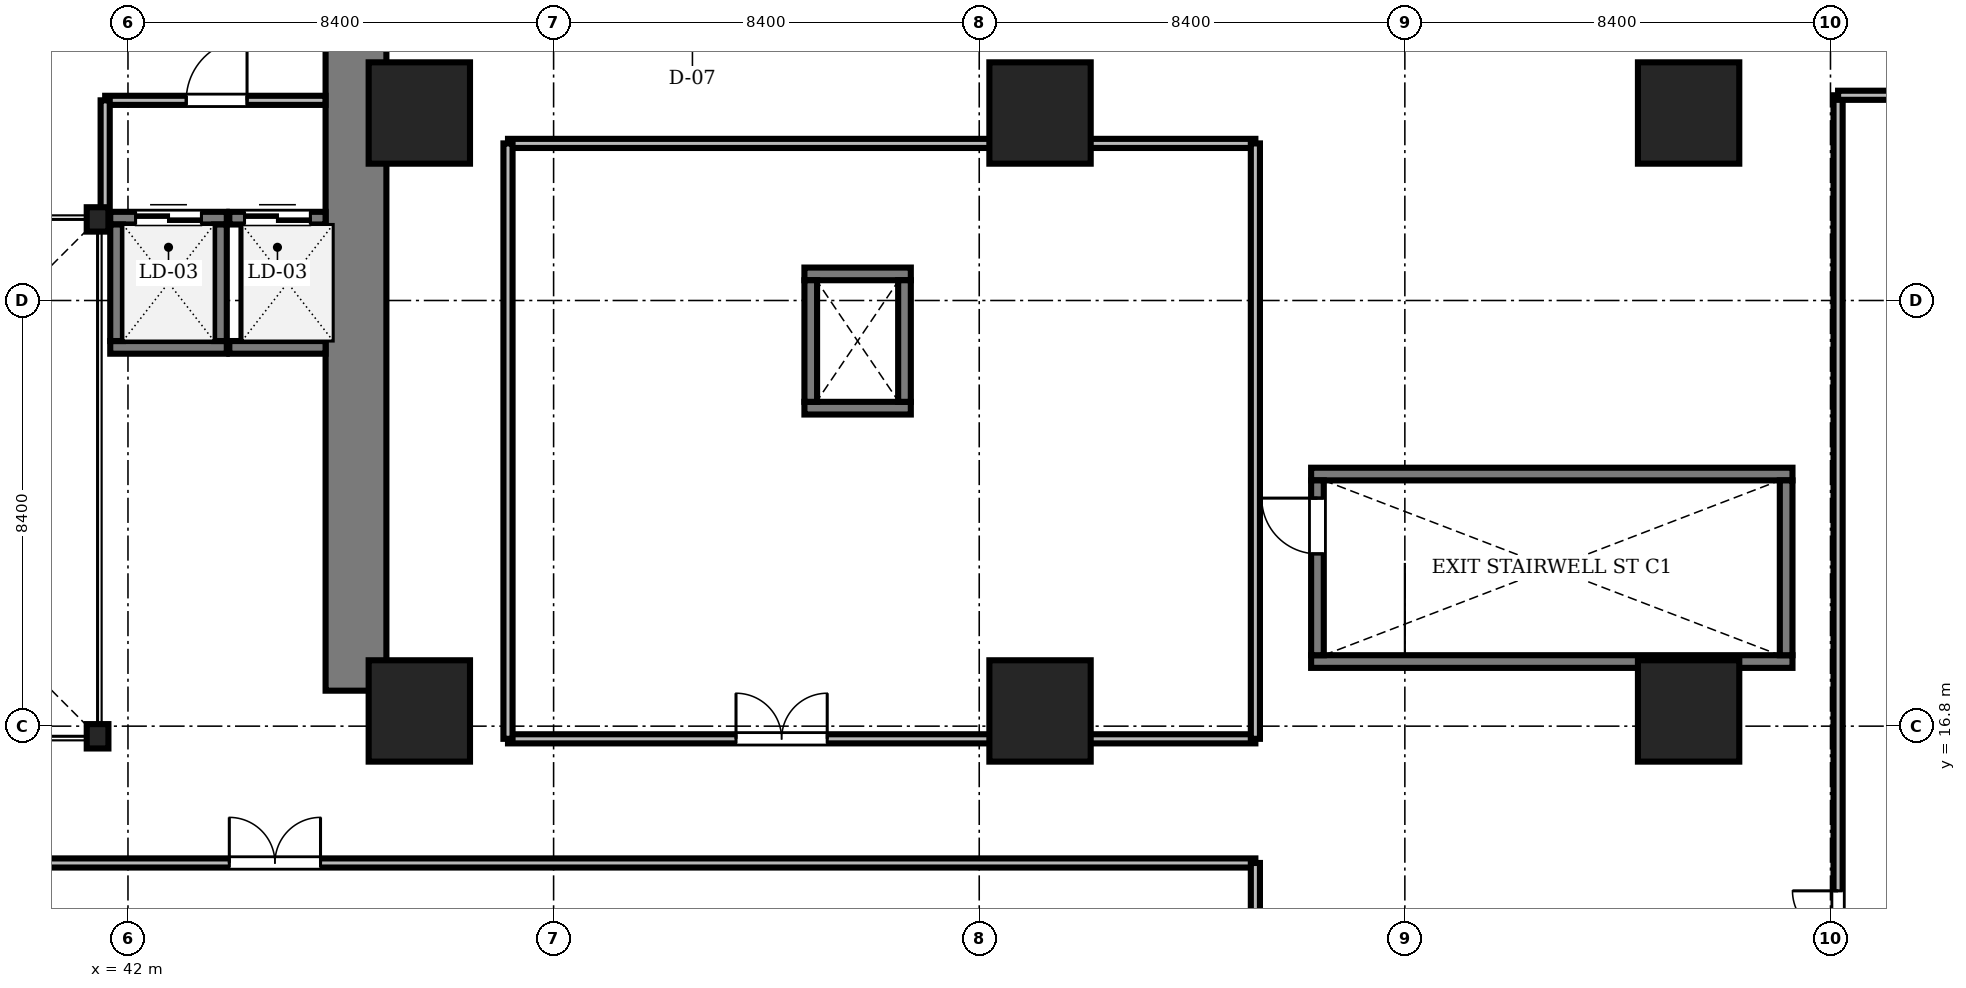
"""IFC4 building model, lengths in metres.
Left out: names, types, materials, properties, quantities, classifications, styles, units other than length and angle.
Written with IfcOpenShell. Run it as: python <this file> out.ifc"""

import sys

from ifc_helpers import new_model, si_unit, direction, frame, frame_2d, origin, origin_2d, place, context, subcontext, project, spatial, rectangle, i_section, extrude, source, transform, mapped, element, fill, save


model = new_model("IFC4")
c1 = context("Model", 3, precision=1e-05, world=origin(), true_north=direction((0.0, 1.0)))
c2 = subcontext(c1, "Body", "Model", "MODEL_VIEW")
j1 = project(units=[si_unit("LENGTHUNIT", "METRE"), si_unit("PLANEANGLEUNIT", "RADIAN")], contexts=[c1])
p1 = place(None, origin())
s1 = spatial("IfcSite", under=j1, at=p1, CompositionType="ELEMENT")
p2 = place(p1, origin())
s2 = spatial("IfcBuilding", under=s1, at=p2, CompositionType="ELEMENT")
p3 = place(p2, frame((0.0, 0.0, 11.4)))
s3 = spatial("IfcBuildingStorey", under=s2, at=p3, CompositionType="ELEMENT", Elevation=11.4)
m1 = source(origin(), c2, "Body", "SweptSolid", [
    extrude(rectangle(XDim=13.15, YDim=1.2, at=frame_2d((6.575, 0.0))), origin(), (0.0, 0.0, 1.0), 5.2),
])
p4 = place(p3, frame((46.5, 17.5, 0.0), z_axis=(0.0, 0.0, 1.0), x_axis=(0.0, 1.0, 0.0)))
e1 = element("IfcWall", 1, at=p4, inside=s3, PredefinedType="SHEAR", context=c2, shape_type="MappedRepresentation", body=[
    mapped(m1, transform((0.0, 0.0, 0.0), scale=1.0)),
])
m2 = source(origin(), c2, "Body", "SweptSolid", [
    extrude(i_section(OverallWidth=0.428, OverallDepth=0.481, WebThickness=0.04, FlangeThickness=0.063, FilletRadius=0.015, at=origin_2d()), origin(), (0.0, 0.0, 1.0), 5.2),
])
for number, where, z_axis, x_axis in (
    (2, (41.4, 16.6, 0.0), (0.0, 0.0, 1.0), (1.0, 0.0, 0.0)),
    (3, (41.4, 26.8, 0.0), (0.0, 0.0, 1.0), (1.0, 0.0, 0.0)),
):
    element("IfcColumn", number, at=place(p3, frame(where, z_axis=z_axis, x_axis=x_axis)), inside=s3, PredefinedType="COLUMN", context=c2, shape_type="MappedRepresentation", body=[
        mapped(m2, transform((0.0, 0.0, 0.0), scale=1.0)),
    ])
m3 = source(origin(), c2, "Body", "SweptSolid", [
    extrude(rectangle(XDim=2.0, YDim=2.0, at=origin_2d()), origin(), (0.0, 0.0, 1.0), 5.2),
])
for number, where, z_axis, x_axis in (
    (4, (47.75, 17.1, 0.0), (0.0, 0.0, 1.0), (1.0, 0.0, 0.0)),
    (5, (60.0, 17.1, 0.0), (0.0, 0.0, 1.0), (1.0, 0.0, 0.0)),
    (6, (72.8, 17.1, 0.0), (0.0, 0.0, 1.0), (1.0, 0.0, 0.0)),
    (7, (47.75, 28.9, 0.0), (0.0, 0.0, 1.0), (1.0, 0.0, 0.0)),
    (8, (60.0, 28.9, 0.0), (0.0, 0.0, 1.0), (1.0, 0.0, 0.0)),
    (9, (72.8, 28.9, 0.0), (0.0, 0.0, 1.0), (1.0, 0.0, 0.0)),
):
    element("IfcColumn", number, at=place(p3, frame(where, z_axis=z_axis, x_axis=x_axis)), inside=s3, PredefinedType="COLUMN", context=c2, shape_type="MappedRepresentation", body=[
        mapped(m3, transform((0.0, 0.0, 0.0), scale=1.0)),
    ])
m4 = source(origin(), c2, "Body", "SweptSolid", [
    extrude(rectangle(XDim=9.5, YDim=0.25, at=frame_2d((4.75, 0.0))), origin(), (0.0, 0.0, 1.0), 5.2),
])
for number, where, z_axis, x_axis in (
    (10, (65.35, 18.075, 0.0), (0.0, 0.0, 1.0), (1.0, 0.0, 0.0)),
    (11, (65.35, 21.775, 0.0), (0.0, 0.0, 1.0), (1.0, 0.0, 0.0)),
):
    element("IfcWall", number, at=place(p3, frame(where, z_axis=z_axis, x_axis=x_axis)), inside=s3, PredefinedType="SOLIDWALL", context=c2, shape_type="MappedRepresentation", body=[
        mapped(m4, transform((0.0, 0.0, 0.0), scale=1.0)),
    ])
m5 = source(origin(), c2, "Body", "SweptSolid", [
    extrude(rectangle(XDim=3.45, YDim=0.25, at=frame_2d((1.725, 0.0))), origin(), (0.0, 0.0, 1.0), 5.2),
])
p5 = place(p3, frame((74.725, 18.2, 0.0), z_axis=(0.0, 0.0, 1.0), x_axis=(0.0, 1.0, 0.0)))
e12 = element("IfcWall", 12, at=p5, inside=s3, PredefinedType="SOLIDWALL", context=c2, shape_type="MappedRepresentation", body=[
    mapped(m5, transform((0.0, 0.0, 0.0), scale=1.0)),
])
p6 = place(p3, frame((65.475, 18.2, 0.0), z_axis=(0.0, 0.0, 1.0), x_axis=(0.0, 1.0, 0.0)))
e13 = element("IfcWall", 13, at=p6, inside=s3, PredefinedType="SOLIDWALL", context=c2, shape_type="MappedRepresentation", body=[
    mapped(m5, transform((0.0, 0.0, 0.0), scale=1.0)),
])
m6 = source(origin(), c2, "Body", "SweptSolid", [
    extrude(rectangle(XDim=1.1, YDim=2.2, at=frame_2d((0.55, 1.1))), frame((0.0, 0.135, 0.0), z_axis=(0.0, -1.0, 0.0), x_axis=(1.0, 0.0, 0.0)), (0.0, 0.0, 1.0), 0.27),
])
p7 = place(p6, frame((2.0, 0.0, 0.0)))
e14 = element("IfcOpeningElement", 14, at=p7, cuts=e13, PredefinedType="OPENING", context=c2, shape_type="MappedRepresentation", body=[
    mapped(m6, transform((0.0, 0.0, 0.0), scale=1.0)),
])
m7 = source(origin(), c2, "Body", "SweptSolid", [
    extrude(rectangle(XDim=2.1, YDim=0.25, at=frame_2d((1.05, 0.0))), origin(), (0.0, 0.0, 1.0), 5.2),
])
for number, where, z_axis, x_axis in (
    (15, (55.35, 23.075, 0.0), (0.0, 0.0, 1.0), (1.0, 0.0, 0.0)),
    (16, (55.35, 25.725, 0.0), (0.0, 0.0, 1.0), (1.0, 0.0, 0.0)),
):
    element("IfcWall", number, at=place(p3, frame(where, z_axis=z_axis, x_axis=x_axis)), inside=s3, PredefinedType="SOLIDWALL", context=c2, shape_type="MappedRepresentation", body=[
        mapped(m7, transform((0.0, 0.0, 0.0), scale=1.0)),
    ])
m8 = source(origin(), c2, "Body", "SweptSolid", [
    extrude(rectangle(XDim=2.4, YDim=0.25, at=frame_2d((1.2, 0.0))), origin(), (0.0, 0.0, 1.0), 5.2),
])
for number, where, z_axis, x_axis in (
    (17, (55.475, 23.2, 0.0), (0.0, 0.0, 1.0), (0.0, 1.0, 0.0)),
    (18, (57.325, 23.2, 0.0), (0.0, 0.0, 1.0), (0.0, 1.0, 0.0)),
):
    element("IfcWall", number, at=place(p3, frame(where, z_axis=z_axis, x_axis=x_axis)), inside=s3, PredefinedType="SOLIDWALL", context=c2, shape_type="MappedRepresentation", body=[
        mapped(m8, transform((0.0, 0.0, 0.0), scale=1.0)),
    ])
m9 = source(origin(), c2, "Body", "SweptSolid", [
    extrude(rectangle(XDim=2.3, YDim=0.25, at=frame_2d((1.15, 0.0))), origin(), (0.0, 0.0, 1.0), 5.2),
])
p8 = place(p3, frame((41.65, 24.275, 0.0), z_axis=(0.0, 0.0, 1.0), x_axis=(1.0, 0.0, 0.0)))
e19 = element("IfcWall", 19, at=p8, inside=s3, PredefinedType="SOLIDWALL", context=c2, shape_type="MappedRepresentation", body=[
    mapped(m9, transform((0.0, 0.0, 0.0), scale=1.0)),
])
p9 = place(p3, frame((41.65, 26.825, 0.0), z_axis=(0.0, 0.0, 1.0), x_axis=(1.0, 0.0, 0.0)))
e20 = element("IfcWall", 20, at=p9, inside=s3, PredefinedType="SOLIDWALL", context=c2, shape_type="MappedRepresentation", body=[
    mapped(m9, transform((0.0, 0.0, 0.0), scale=1.0)),
])
m10 = source(origin(), c2, "Body", "SweptSolid", [
    extrude(rectangle(XDim=1.3, YDim=2.3, at=frame_2d((0.65, 1.15))), frame((0.0, 0.135, 0.0), z_axis=(0.0, -1.0, 0.0), x_axis=(1.0, 0.0, 0.0)), (0.0, 0.0, 1.0), 0.27),
])
p10 = place(p9, frame((0.5, 0.0, 0.0)))
e21 = element("IfcOpeningElement", 21, at=p10, cuts=e20, PredefinedType="OPENING", context=c2, shape_type="MappedRepresentation", body=[
    mapped(m10, transform((0.0, 0.0, 0.0), scale=1.0)),
])
for number, where, z_axis, x_axis in (
    (22, (41.775, 24.4, 0.0), (0.0, 0.0, 1.0), (0.0, 1.0, 0.0)),
    (23, (43.825, 24.4, 0.0), (0.0, 0.0, 1.0), (0.0, 1.0, 0.0)),
):
    element("IfcWall", number, at=place(p3, frame(where, z_axis=z_axis, x_axis=x_axis)), inside=s3, PredefinedType="SOLIDWALL", context=c2, shape_type="MappedRepresentation", body=[
        mapped(m9, transform((0.0, 0.0, 0.0), scale=1.0)),
    ])
m11 = source(origin(), c2, "Body", "SweptSolid", [
    extrude(rectangle(XDim=1.9, YDim=0.25, at=frame_2d((0.95, 0.0))), origin(), (0.0, 0.0, 1.0), 5.2),
])
p11 = place(p3, frame((44.0, 24.275, 0.0), z_axis=(0.0, 0.0, 1.0), x_axis=(1.0, 0.0, 0.0)))
e24 = element("IfcWall", 24, at=p11, inside=s3, PredefinedType="SOLIDWALL", context=c2, shape_type="MappedRepresentation", body=[
    mapped(m11, transform((0.0, 0.0, 0.0), scale=1.0)),
])
p12 = place(p3, frame((44.0, 26.825, 0.0), z_axis=(0.0, 0.0, 1.0), x_axis=(1.0, 0.0, 0.0)))
e25 = element("IfcWall", 25, at=p12, inside=s3, PredefinedType="SOLIDWALL", context=c2, shape_type="MappedRepresentation", body=[
    mapped(m11, transform((0.0, 0.0, 0.0), scale=1.0)),
])
p13 = place(p12, frame((0.3, 0.0, 0.0)))
e26 = element("IfcOpeningElement", 26, at=p13, cuts=e25, PredefinedType="OPENING", context=c2, shape_type="MappedRepresentation", body=[
    mapped(m10, transform((0.0, 0.0, 0.0), scale=1.0)),
])
m12 = source(origin(), c2, "Body", "SweptSolid", [
    extrude(rectangle(XDim=30.25, YDim=0.18, at=frame_2d((15.125, 0.0))), origin(), (0.0, 0.0, 1.0), 3.392),
])
p14 = place(p3, frame((34.0, 14.1, 0.0), z_axis=(0.0, 0.0, 1.0), x_axis=(1.0, 0.0, 0.0)))
e27 = element("IfcWall", 27, at=p14, inside=s3, PredefinedType="PARTITIONING", context=c2, shape_type="MappedRepresentation", body=[
    mapped(m12, transform((0.0, 0.0, 0.0), scale=1.0)),
])
m13 = source(origin(), c2, "Body", "SweptSolid", [
    extrude(rectangle(XDim=1.8, YDim=2.4, at=frame_2d((0.9, 1.2))), frame((0.0, 0.1, 0.0), z_axis=(0.0, -1.0, 0.0), x_axis=(1.0, 0.0, 0.0)), (0.0, 0.0, 1.0), 0.2),
])
p15 = place(p14, frame((10.0, 0.0, 0.0)))
e28 = element("IfcOpeningElement", 28, at=p15, cuts=e27, PredefinedType="OPENING", context=c2, shape_type="MappedRepresentation", body=[
    mapped(m13, transform((0.0, 0.0, 0.0), scale=1.0)),
])
m14 = source(origin(), c2, "Body", "SweptSolid", [
    extrude(rectangle(XDim=25.7, YDim=0.18, at=frame_2d((12.85, 0.0))), origin(), (0.0, 0.0, 1.0), 4.668),
])
p16 = place(p3, frame((75.75, 3.55, 0.0), z_axis=(0.0, 0.0, 1.0), x_axis=(0.0, 1.0, 0.0)))
e29 = element("IfcWall", 29, at=p16, inside=s3, PredefinedType="PARTITIONING", context=c2, shape_type="MappedRepresentation", body=[
    mapped(m14, transform((0.0, 0.0, 0.0), scale=1.0)),
])
p17 = place(p16, frame((8.2, 0.0, 0.0)))
e30 = element("IfcOpeningElement", 30, at=p17, cuts=e29, PredefinedType="OPENING", context=c2, shape_type="MappedRepresentation", body=[
    mapped(m13, transform((0.0, 0.0, 0.0), scale=1.0)),
])
m15 = source(origin(), c2, "Body", "SweptSolid", [
    extrude(rectangle(XDim=14.75, YDim=0.18, at=frame_2d((7.375, 0.0))), origin(), (0.0, 0.0, 1.0), 4.592),
])
p18 = place(p3, frame((49.5, 16.55, 0.0), z_axis=(0.0, 0.0, 1.0), x_axis=(1.0, 0.0, 0.0)))
e31 = element("IfcWall", 31, at=p18, inside=s3, PredefinedType="PARTITIONING", context=c2, shape_type="MappedRepresentation", body=[
    mapped(m15, transform((0.0, 0.0, 0.0), scale=1.0)),
])
p19 = place(p18, frame((4.5, 0.0, 0.0)))
e32 = element("IfcOpeningElement", 32, at=p19, cuts=e31, PredefinedType="OPENING", context=c2, shape_type="MappedRepresentation", body=[
    mapped(m13, transform((0.0, 0.0, 0.0), scale=1.0)),
])
m16 = source(origin(), c2, "Body", "SweptSolid", [
    extrude(rectangle(XDim=4.348, YDim=0.18, at=frame_2d((2.174, 0.0))), origin(), (0.0, 0.0, 1.0), 5.2),
])
p20 = place(p3, frame((41.55, 29.15, 0.0), z_axis=(0.0, 0.0, 1.0), x_axis=(1.0, 0.0, 0.0)))
e33 = element("IfcWall", 33, at=p20, inside=s3, PredefinedType="PARTITIONING", context=c2, shape_type="MappedRepresentation", body=[
    mapped(m16, transform((0.0, 0.0, 0.0), scale=1.0)),
])
m17 = source(origin(), c2, "Body", "SweptSolid", [
    extrude(rectangle(XDim=1.2, YDim=2.2, at=frame_2d((0.6, 1.1))), frame((0.0, 0.1, 0.0), z_axis=(0.0, -1.0, 0.0), x_axis=(1.0, 0.0, 0.0)), (0.0, 0.0, 1.0), 0.2),
])
p21 = place(p20, frame((1.6, 0.0, 0.0)))
e34 = element("IfcOpeningElement", 34, at=p21, cuts=e33, PredefinedType="OPENING", context=c2, shape_type="MappedRepresentation", body=[
    mapped(m17, transform((0.0, 0.0, 0.0), scale=1.0)),
])
p22 = place(p3, frame((49.5, 28.3, 0.0), z_axis=(0.0, 0.0, 1.0), x_axis=(1.0, 0.0, 0.0)))
e35 = element("IfcWall", 35, at=p22, inside=s3, PredefinedType="PARTITIONING", context=c2, shape_type="MappedRepresentation", body=[
    mapped(m15, transform((0.0, 0.0, 0.0), scale=1.0)),
])
m18 = source(origin(), c2, "Body", "SweptSolid", [
    extrude(rectangle(XDim=11.75, YDim=0.18, at=frame_2d((5.875, 0.0))), origin(), (0.0, 0.0, 1.0), 4.668),
])
for number, where, z_axis, x_axis in (
    (36, (49.5, 16.55, 0.0), (0.0, 0.0, 1.0), (0.0, 1.0, 0.0)),
    (37, (64.25, 16.55, 0.0), (0.0, 0.0, 1.0), (0.0, 1.0, 0.0)),
):
    element("IfcWall", number, at=place(p3, frame(where, z_axis=z_axis, x_axis=x_axis)), inside=s3, PredefinedType="PARTITIONING", context=c2, shape_type="MappedRepresentation", body=[
        mapped(m18, transform((0.0, 0.0, 0.0), scale=1.0)),
    ])
m19 = source(origin(), c2, "Body", "SweptSolid", [
    extrude(rectangle(XDim=10.55, YDim=0.18, at=frame_2d((5.275, 0.0))), origin(), (0.0, 0.0, 1.0), 4.792),
])
p23 = place(p3, frame((64.25, 3.55, 0.0), z_axis=(0.0, 0.0, 1.0), x_axis=(0.0, 1.0, 0.0)))
e38 = element("IfcWall", 38, at=p23, inside=s3, PredefinedType="PARTITIONING", context=c2, shape_type="MappedRepresentation", body=[
    mapped(m19, transform((0.0, 0.0, 0.0), scale=1.0)),
])
m20 = source(origin(), c2, "Body", "SweptSolid", [
    extrude(rectangle(XDim=4.77, YDim=0.18, at=frame_2d((2.385, 0.0))), origin(), (0.0, 0.0, 1.0), 5.2),
])
p24 = place(p3, frame((75.75, 29.25, 0.0), z_axis=(0.0, 0.0, 1.0), x_axis=(1.0, 0.0, 0.0)))
e39 = element("IfcWall", 39, at=p24, inside=s3, PredefinedType="PARTITIONING", context=c2, shape_type="MappedRepresentation", body=[
    mapped(m20, transform((0.0, 0.0, 0.0), scale=1.0)),
])
m21 = source(origin(), c2, "Body", "SweptSolid", [
    extrude(rectangle(XDim=2.35, YDim=0.18, at=frame_2d((1.175, 0.0))), origin(), (0.0, 0.0, 1.0), 5.2),
])
p25 = place(p3, frame((41.55, 26.8, 0.0), z_axis=(0.0, 0.0, 1.0), x_axis=(0.0, 1.0, 0.0)))
e40 = element("IfcWall", 40, at=p25, inside=s3, PredefinedType="PARTITIONING", context=c2, shape_type="MappedRepresentation", body=[
    mapped(m21, transform((0.0, 0.0, 0.0), scale=1.0)),
])
m22 = source(origin(), c2, "Body", "SweptSolid", [
    extrude(rectangle(XDim=1.1, YDim=2.2, at=frame_2d((0.55, 1.1))), frame((0.0, 0.025, 0.0), z_axis=(0.0, -1.0, 0.0), x_axis=(1.0, 0.0, 0.0)), (0.0, 0.0, 1.0), 0.05),
])
p26 = place(p7, origin())
e41 = element("IfcDoor", 41, at=p26, inside=s3, OperationType="SINGLE_SWING_RIGHT", PredefinedType="DOOR", context=c2, shape_type="MappedRepresentation", body=[
    mapped(m22, transform((0.0, 0.0, 0.0), scale=1.0)),
])
fill(e14, e41)
m23 = source(origin(), c2, "Body", "SweptSolid", [
    extrude(rectangle(XDim=1.3, YDim=2.3, at=frame_2d((0.65, 1.15))), frame((0.0, 0.025, 0.0), z_axis=(0.0, -1.0, 0.0), x_axis=(1.0, 0.0, 0.0)), (0.0, 0.0, 1.0), 0.05),
])
p27 = place(p10, origin())
e42 = element("IfcDoor", 42, at=p27, inside=s3, OperationType="DOUBLE_DOOR_SLIDING", PredefinedType="DOOR", context=c2, shape_type="MappedRepresentation", body=[
    mapped(m23, transform((0.0, 0.0, 0.0), scale=1.0)),
])
fill(e21, e42)
p28 = place(p13, origin())
e43 = element("IfcDoor", 43, at=p28, inside=s3, OperationType="DOUBLE_DOOR_SLIDING", PredefinedType="DOOR", context=c2, shape_type="MappedRepresentation", body=[
    mapped(m23, transform((0.0, 0.0, 0.0), scale=1.0)),
])
fill(e26, e43)
m24 = source(origin(), c2, "Body", "SweptSolid", [
    extrude(rectangle(XDim=1.8, YDim=2.4, at=frame_2d((0.9, 1.2))), frame((0.0, 0.025, 0.0), z_axis=(0.0, -1.0, 0.0), x_axis=(1.0, 0.0, 0.0)), (0.0, 0.0, 1.0), 0.05),
])
p29 = place(p15, origin())
e44 = element("IfcDoor", 44, at=p29, inside=s3, OperationType="DOUBLE_DOOR_SINGLE_SWING", PredefinedType="DOOR", context=c2, shape_type="MappedRepresentation", body=[
    mapped(m24, transform((0.0, 0.0, 0.0), scale=1.0)),
])
fill(e28, e44)
p30 = place(p17, origin())
e45 = element("IfcDoor", 45, at=p30, inside=s3, OperationType="DOUBLE_DOOR_SINGLE_SWING", PredefinedType="DOOR", context=c2, shape_type="MappedRepresentation", body=[
    mapped(m24, transform((0.0, 0.0, 0.0), scale=1.0)),
])
fill(e30, e45)
p31 = place(p19, origin())
e46 = element("IfcDoor", 46, at=p31, inside=s3, OperationType="DOUBLE_DOOR_SINGLE_SWING", PredefinedType="DOOR", context=c2, shape_type="MappedRepresentation", body=[
    mapped(m24, transform((0.0, 0.0, 0.0), scale=1.0)),
])
fill(e32, e46)
m25 = source(origin(), c2, "Body", "SweptSolid", [
    extrude(rectangle(XDim=1.2, YDim=2.2, at=frame_2d((0.6, 1.1))), frame((0.0, 0.025, 0.0), z_axis=(0.0, -1.0, 0.0), x_axis=(1.0, 0.0, 0.0)), (0.0, 0.0, 1.0), 0.05),
])
p32 = place(p21, origin())
e47 = element("IfcDoor", 47, at=p32, inside=s3, OperationType="SINGLE_SWING_RIGHT", PredefinedType="DOOR", context=c2, shape_type="MappedRepresentation", body=[
    mapped(m25, transform((0.0, 0.0, 0.0), scale=1.0)),
])
fill(e34, e47)
save(model, sys.argv[1])
